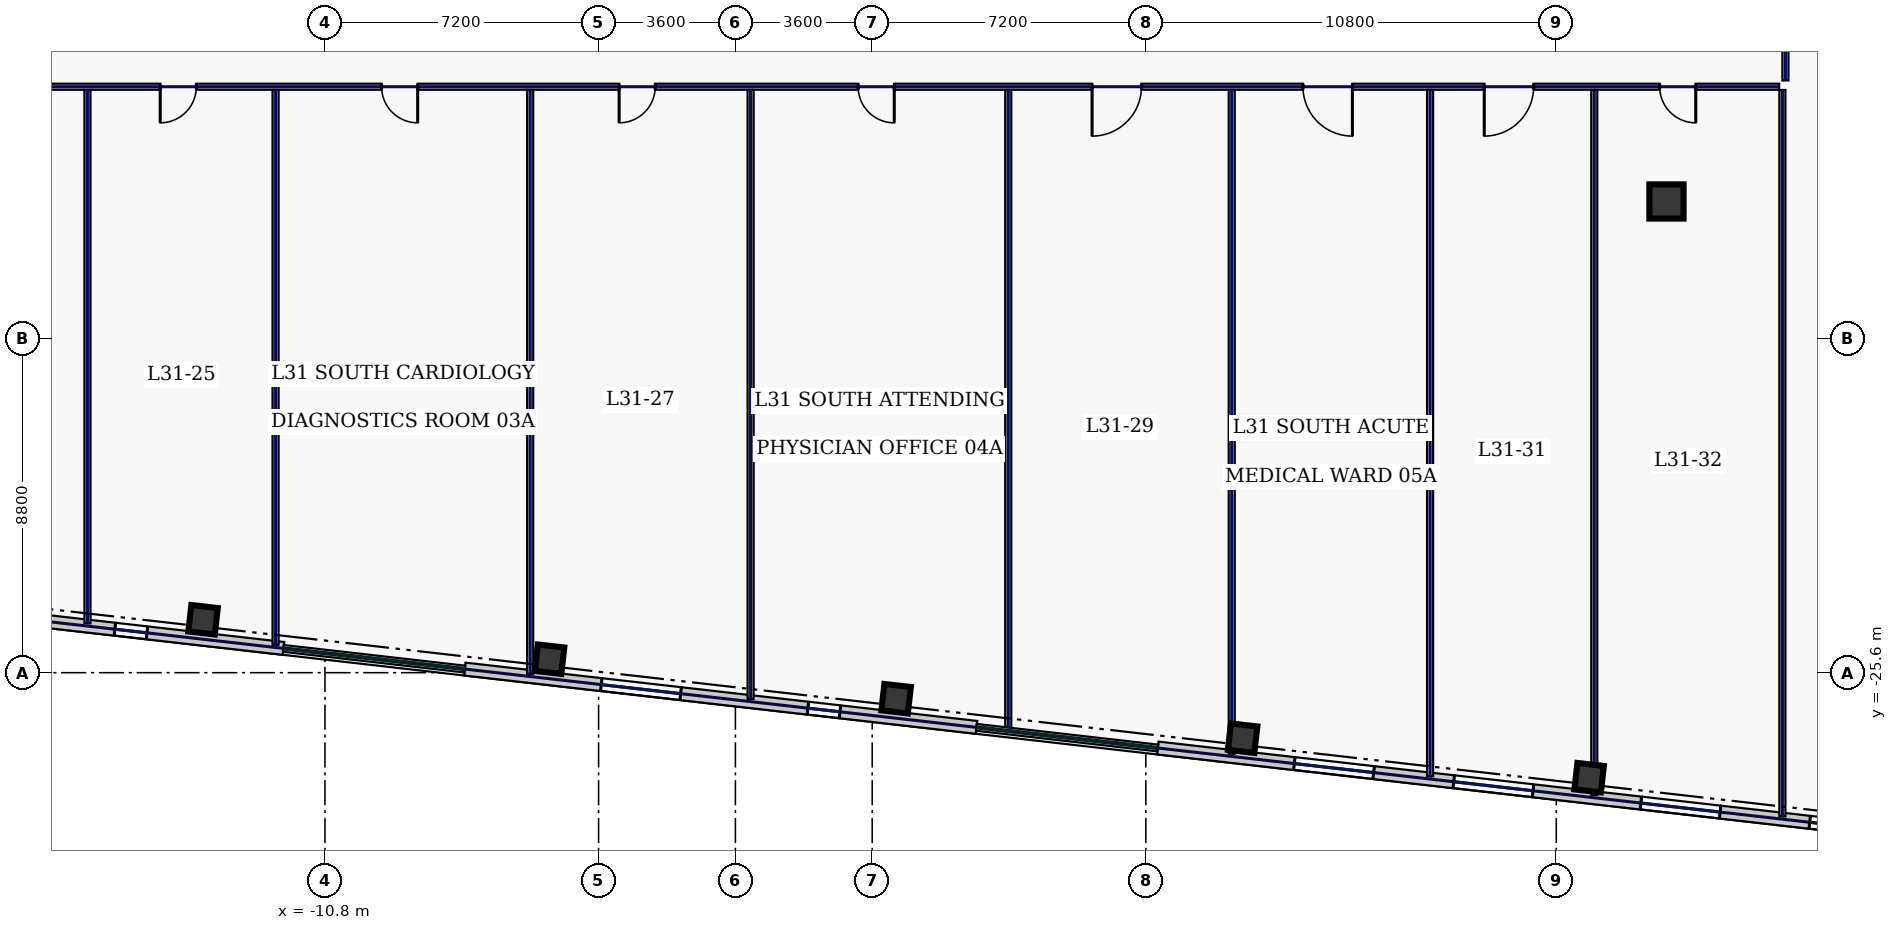
"""IFC4 building model, lengths in metres.
Left out: names, types, materials, properties, quantities, classifications, styles, units other than length and angle.
Written with IfcOpenShell. Run it as: python <this file> out.ifc"""

import sys

from ifc_helpers import new_model, si_unit, direction, frame, frame_2d, origin, origin_2d, place, context, subcontext, project, spatial, rectangle, hollow_rectangle, extrude, element, fill, save


model = new_model("IFC4")
c1 = context("Model", 3, precision=1e-05, world=origin(), true_north=direction((0.0, 1.0)))
c2 = subcontext(c1, "Body", "Model", "MODEL_VIEW")
j1 = project(units=[si_unit("LENGTHUNIT", "METRE"), si_unit("PLANEANGLEUNIT", "RADIAN")], contexts=[c1])
p1 = place(None, origin())
s1 = spatial("IfcSite", under=j1, at=p1, CompositionType="ELEMENT")
p2 = place(p1, origin())
s2 = spatial("IfcBuilding", under=s1, at=p2, CompositionType="ELEMENT")
p3 = place(p2, frame((0.0, 0.0, 137.4)))
s3 = spatial("IfcBuildingStorey", under=s2, at=p3, CompositionType="ELEMENT", Elevation=137.4)
p4 = place(p3, frame((24.5, -13.2, 0.0), z_axis=(0.0, 0.0, 1.0), x_axis=(1.0, 0.0, 0.0)))
e1 = element("IfcColumn", 1, at=p4, inside=s3, PredefinedType="COLUMN", context=c2, shape_type="SweptSolid", body=[
    extrude(hollow_rectangle(XDim=0.9, YDim=0.9, WallThickness=0.04, at=origin_2d()), origin(), (0.0, 0.0, 1.0), 3.74),
])
for number, where, z_axis, x_axis in (
    (2, (-14.008, -24.207, 0.0), (0.0, 0.0, 1.0), (0.994, -0.113, 0.0)),
    (3, (-4.89, -25.246, 0.0), (0.0, 0.0, 1.0), (0.994, -0.113, 0.0)),
    (4, (4.229, -26.284, 0.0), (0.0, 0.0, 1.0), (0.994, -0.113, 0.0)),
    (5, (13.347, -27.323, 0.0), (0.0, 0.0, 1.0), (0.994, -0.113, 0.0)),
    (6, (22.465, -28.362, 0.0), (0.0, 0.0, 1.0), (0.994, -0.113, 0.0)),
):
    element("IfcColumn", number, at=place(p3, frame(where, z_axis=z_axis, x_axis=x_axis)), inside=s3, PredefinedType="COLUMN", context=c2, shape_type="SweptSolid", body=[
        extrude(hollow_rectangle(XDim=0.7, YDim=0.7, WallThickness=0.032, at=origin_2d()), origin(), (0.0, 0.0, 1.0), 3.74),
    ])
p5 = place(p3, frame((-32.977, -22.559, 0.0), z_axis=(0.0, 0.0, 1.0), x_axis=(0.993571214605, -0.113208840243, 0.0)))
e7 = element("IfcWall", 7, at=p5, inside=s3, PredefinedType="STANDARD", context=c2, shape_type="SweptSolid", body=[
    extrude(rectangle(XDim=21.223, YDim=0.34, at=frame_2d((10.611, 0.0))), origin(), (0.0, 0.0, 1.0), 3.74),
])
p6 = place(p5, frame((2.108, 0.0, 0.67)))
e8 = element("IfcOpeningElement", 8, at=p6, cuts=e7, PredefinedType="OPENING", context=c2, shape_type="SweptSolid", body=[
    extrude(rectangle(XDim=2.1, YDim=2.2, at=frame_2d((1.05, 1.1))), frame((0.0, 0.18, 0.0), z_axis=(0.0, -1.0, 0.0), x_axis=(1.0, 0.0, 0.0)), (0.0, 0.0, 1.0), 0.36),
])
p7 = place(p5, frame((6.329, 0.0, 0.67)))
e9 = element("IfcOpeningElement", 9, at=p7, cuts=e7, PredefinedType="OPENING", context=c2, shape_type="SweptSolid", body=[
    extrude(rectangle(XDim=2.1, YDim=2.2, at=frame_2d((1.05, 1.1))), frame((0.0, 0.18, 0.0), z_axis=(0.0, -1.0, 0.0), x_axis=(1.0, 0.0, 0.0)), (0.0, 0.0, 1.0), 0.36),
])
p8 = place(p5, frame((11.285, 0.0, 0.67)))
e10 = element("IfcOpeningElement", 10, at=p8, cuts=e7, PredefinedType="OPENING", context=c2, shape_type="SweptSolid", body=[
    extrude(rectangle(XDim=2.1, YDim=2.2, at=frame_2d((1.05, 1.1))), frame((0.0, 0.18, 0.0), z_axis=(0.0, -1.0, 0.0), x_axis=(1.0, 0.0, 0.0)), (0.0, 0.0, 1.0), 0.36),
])
p9 = place(p5, frame((16.756, 0.0, 0.67)))
e11 = element("IfcOpeningElement", 11, at=p9, cuts=e7, PredefinedType="OPENING", context=c2, shape_type="SweptSolid", body=[
    extrude(rectangle(XDim=0.85, YDim=1.85, at=frame_2d((0.425, 0.925))), frame((0.0, 0.18, 0.0), z_axis=(0.0, -1.0, 0.0), x_axis=(1.0, 0.0, 0.0)), (0.0, 0.0, 1.0), 0.36),
])
p10 = place(p3, frame((-7.122, -25.504, 0.0), z_axis=(0.0, 0.0, 1.0), x_axis=(0.993571685551, -0.11320470693, 0.0)))
e12 = element("IfcWall", 12, at=p10, inside=s3, PredefinedType="STANDARD", context=c2, shape_type="SweptSolid", body=[
    extrude(rectangle(XDim=13.554, YDim=0.34, at=frame_2d((6.777, 0.0))), origin(), (0.0, 0.0, 1.0), 3.74),
])
p11 = place(p10, frame((3.616, 0.0, 0.67)))
e13 = element("IfcOpeningElement", 13, at=p11, cuts=e12, PredefinedType="OPENING", context=c2, shape_type="SweptSolid", body=[
    extrude(rectangle(XDim=2.1, YDim=2.2, at=frame_2d((1.05, 1.1))), frame((0.0, 0.18, 0.0), z_axis=(0.0, -1.0, 0.0), x_axis=(1.0, 0.0, 0.0)), (0.0, 0.0, 1.0), 0.36),
])
p12 = place(p10, frame((9.088, 0.0, 0.67)))
e14 = element("IfcOpeningElement", 14, at=p12, cuts=e12, PredefinedType="OPENING", context=c2, shape_type="SweptSolid", body=[
    extrude(rectangle(XDim=0.85, YDim=1.85, at=frame_2d((0.425, 0.925))), frame((0.0, 0.18, 0.0), z_axis=(0.0, -1.0, 0.0), x_axis=(1.0, 0.0, 0.0)), (0.0, 0.0, 1.0), 0.36),
])
p13 = place(p3, frame((11.115, -27.582, 0.0), z_axis=(0.0, 0.0, 1.0), x_axis=(0.993572655904, -0.113196190044, 0.0)))
e15 = element("IfcWall", 15, at=p13, inside=s3, PredefinedType="STANDARD", context=c2, shape_type="SweptSolid", body=[
    extrude(rectangle(XDim=21.223, YDim=0.34, at=frame_2d((10.611, 0.0))), origin(), (0.0, 0.0, 1.0), 3.74),
])
p14 = place(p13, frame((3.616, 0.0, 0.67)))
e16 = element("IfcOpeningElement", 16, at=p14, cuts=e15, PredefinedType="OPENING", context=c2, shape_type="SweptSolid", body=[
    extrude(rectangle(XDim=2.1, YDim=2.2, at=frame_2d((1.05, 1.1))), frame((0.0, 0.18, 0.0), z_axis=(0.0, -1.0, 0.0), x_axis=(1.0, 0.0, 0.0)), (0.0, 0.0, 1.0), 0.36),
])
p15 = place(p13, frame((7.838, 0.0, 0.67)))
e17 = element("IfcOpeningElement", 17, at=p15, cuts=e15, PredefinedType="OPENING", context=c2, shape_type="SweptSolid", body=[
    extrude(rectangle(XDim=2.1, YDim=2.2, at=frame_2d((1.05, 1.1))), frame((0.0, 0.18, 0.0), z_axis=(0.0, -1.0, 0.0), x_axis=(1.0, 0.0, 0.0)), (0.0, 0.0, 1.0), 0.36),
])
p16 = place(p13, frame((12.794, 0.0, 0.67)))
e18 = element("IfcOpeningElement", 18, at=p16, cuts=e15, PredefinedType="OPENING", context=c2, shape_type="SweptSolid", body=[
    extrude(rectangle(XDim=2.1, YDim=2.2, at=frame_2d((1.05, 1.1))), frame((0.0, 0.18, 0.0), z_axis=(0.0, -1.0, 0.0), x_axis=(1.0, 0.0, 0.0)), (0.0, 0.0, 1.0), 0.36),
])
p17 = place(p13, frame((17.265, 0.0, 0.22)))
e19 = element("IfcOpeningElement", 19, at=p17, cuts=e15, PredefinedType="OPENING", context=c2, shape_type="SweptSolid", body=[
    extrude(rectangle(XDim=1.6, YDim=1.2, at=frame_2d((0.8, 0.6))), frame((0.0, 0.18, 0.0), z_axis=(0.0, -1.0, 0.0), x_axis=(1.0, 0.0, 0.0)), (0.0, 0.0, 1.0), 0.36),
])
p18 = place(p3, frame((27.63, 10.115, 0.0), z_axis=(0.0, 0.0, 1.0), x_axis=(0.0, -1.0, 0.0)))
e20 = element("IfcWall", 20, at=p18, inside=s3, PredefinedType="PARTITIONING", context=c2, shape_type="SweptSolid", body=[
    extrude(rectangle(XDim=20.13, YDim=0.16, at=frame_2d((10.065, 0.0))), origin(), (0.0, 0.0, 1.0), 3.74),
])
p19 = place(p18, frame((17.181, 0.0, 0.0)))
e21 = element("IfcOpeningElement", 21, at=p19, cuts=e20, PredefinedType="OPENING", context=c2, shape_type="SweptSolid", body=[
    extrude(rectangle(XDim=0.95, YDim=2.2, at=frame_2d((0.475, 1.1))), frame((0.0, 0.09, 0.0), z_axis=(0.0, -1.0, 0.0), x_axis=(1.0, 0.0, 0.0)), (0.0, 0.0, 1.0), 0.18),
])
p20 = place(p18, frame((12.325, 0.0, 0.0)))
e22 = element("IfcOpeningElement", 22, at=p20, cuts=e20, PredefinedType="OPENING", context=c2, shape_type="SweptSolid", body=[
    extrude(rectangle(XDim=0.95, YDim=2.2, at=frame_2d((0.475, 1.1))), frame((0.0, 0.09, 0.0), z_axis=(0.0, -1.0, 0.0), x_axis=(1.0, 0.0, 0.0)), (0.0, 0.0, 1.0), 0.18),
])
p21 = place(p18, frame((7.125, 0.0, 0.0)))
e23 = element("IfcOpeningElement", 23, at=p21, cuts=e20, PredefinedType="OPENING", context=c2, shape_type="SweptSolid", body=[
    extrude(rectangle(XDim=0.95, YDim=2.2, at=frame_2d((0.475, 1.1))), frame((0.0, 0.09, 0.0), z_axis=(0.0, -1.0, 0.0), x_axis=(1.0, 0.0, 0.0)), (0.0, 0.0, 1.0), 0.18),
])
p22 = place(p18, frame((2.219, 0.0, 0.0)))
e24 = element("IfcOpeningElement", 24, at=p22, cuts=e20, PredefinedType="OPENING", context=c2, shape_type="SweptSolid", body=[
    extrude(rectangle(XDim=0.95, YDim=2.2, at=frame_2d((0.475, 1.1))), frame((0.0, 0.09, 0.0), z_axis=(0.0, -1.0, 0.0), x_axis=(1.0, 0.0, 0.0)), (0.0, 0.0, 1.0), 0.18),
])
p23 = place(p3, frame((27.465, -10.18, 0.0), z_axis=(0.0, 0.0, 1.0), x_axis=(-1.0, 0.0, 0.0)))
e25 = element("IfcWall", 25, at=p23, inside=s3, PredefinedType="PARTITIONING", context=c2, shape_type="SweptSolid", body=[
    extrude(rectangle(XDim=54.93, YDim=0.16, at=frame_2d((27.465, 0.0))), origin(), (0.0, 0.0, 1.0), 3.74),
])
p24 = place(p23, frame((52.106, 0.0, 0.0)))
e26 = element("IfcOpeningElement", 26, at=p24, cuts=e25, PredefinedType="OPENING", context=c2, shape_type="SweptSolid", body=[
    extrude(rectangle(XDim=0.95, YDim=2.2, at=frame_2d((0.475, 1.1))), frame((0.0, 0.09, 0.0), z_axis=(0.0, -1.0, 0.0), x_axis=(1.0, 0.0, 0.0)), (0.0, 0.0, 1.0), 0.18),
])
p25 = place(p23, frame((47.05, 0.0, 0.0)))
e27 = element("IfcOpeningElement", 27, at=p25, cuts=e25, PredefinedType="OPENING", context=c2, shape_type="SweptSolid", body=[
    extrude(rectangle(XDim=0.95, YDim=2.2, at=frame_2d((0.475, 1.1))), frame((0.0, 0.09, 0.0), z_axis=(0.0, -1.0, 0.0), x_axis=(1.0, 0.0, 0.0)), (0.0, 0.0, 1.0), 0.18),
])
p26 = place(p23, frame((41.65, 0.0, 0.0)))
e28 = element("IfcOpeningElement", 28, at=p26, cuts=e25, PredefinedType="OPENING", context=c2, shape_type="SweptSolid", body=[
    extrude(rectangle(XDim=0.95, YDim=2.2, at=frame_2d((0.475, 1.1))), frame((0.0, 0.09, 0.0), z_axis=(0.0, -1.0, 0.0), x_axis=(1.0, 0.0, 0.0)), (0.0, 0.0, 1.0), 0.18),
])
p27 = place(p23, frame((35.825, 0.0, 0.0)))
e29 = element("IfcOpeningElement", 29, at=p27, cuts=e25, PredefinedType="OPENING", context=c2, shape_type="SweptSolid", body=[
    extrude(rectangle(XDim=0.95, YDim=2.2, at=frame_2d((0.475, 1.1))), frame((0.0, 0.09, 0.0), z_axis=(0.0, -1.0, 0.0), x_axis=(1.0, 0.0, 0.0)), (0.0, 0.0, 1.0), 0.18),
])
p28 = place(p23, frame((29.575, 0.0, 0.0)))
e30 = element("IfcOpeningElement", 30, at=p28, cuts=e25, PredefinedType="OPENING", context=c2, shape_type="SweptSolid", body=[
    extrude(rectangle(XDim=0.95, YDim=2.2, at=frame_2d((0.475, 1.1))), frame((0.0, 0.09, 0.0), z_axis=(0.0, -1.0, 0.0), x_axis=(1.0, 0.0, 0.0)), (0.0, 0.0, 1.0), 0.18),
])
p29 = place(p23, frame((23.285, 0.0, 0.0)))
e31 = element("IfcOpeningElement", 31, at=p29, cuts=e25, PredefinedType="OPENING", context=c2, shape_type="SweptSolid", body=[
    extrude(rectangle(XDim=0.95, YDim=2.2, at=frame_2d((0.475, 1.1))), frame((0.0, 0.09, 0.0), z_axis=(0.0, -1.0, 0.0), x_axis=(1.0, 0.0, 0.0)), (0.0, 0.0, 1.0), 0.18),
])
p30 = place(p23, frame((16.78, 0.0, 0.0)))
e32 = element("IfcOpeningElement", 32, at=p30, cuts=e25, PredefinedType="OPENING", context=c2, shape_type="SweptSolid", body=[
    extrude(rectangle(XDim=1.3, YDim=2.2, at=frame_2d((0.65, 1.1))), frame((0.0, 0.09, 0.0), z_axis=(0.0, -1.0, 0.0), x_axis=(1.0, 0.0, 0.0)), (0.0, 0.0, 1.0), 0.18),
])
p31 = place(p23, frame((11.23, 0.0, 0.0)))
e33 = element("IfcOpeningElement", 33, at=p31, cuts=e25, PredefinedType="OPENING", context=c2, shape_type="SweptSolid", body=[
    extrude(rectangle(XDim=1.3, YDim=2.2, at=frame_2d((0.65, 1.1))), frame((0.0, 0.09, 0.0), z_axis=(0.0, -1.0, 0.0), x_axis=(1.0, 0.0, 0.0)), (0.0, 0.0, 1.0), 0.18),
])
p32 = place(p23, frame((6.46, 0.0, 0.0)))
e34 = element("IfcOpeningElement", 34, at=p32, cuts=e25, PredefinedType="OPENING", context=c2, shape_type="SweptSolid", body=[
    extrude(rectangle(XDim=1.3, YDim=2.2, at=frame_2d((0.65, 1.1))), frame((0.0, 0.09, 0.0), z_axis=(0.0, -1.0, 0.0), x_axis=(1.0, 0.0, 0.0)), (0.0, 0.0, 1.0), 0.18),
])
p33 = place(p23, frame((2.194, 0.0, 0.0)))
e35 = element("IfcOpeningElement", 35, at=p33, cuts=e25, PredefinedType="OPENING", context=c2, shape_type="SweptSolid", body=[
    extrude(rectangle(XDim=0.95, YDim=2.2, at=frame_2d((0.475, 1.1))), frame((0.0, 0.09, 0.0), z_axis=(0.0, -1.0, 0.0), x_axis=(1.0, 0.0, 0.0)), (0.0, 0.0, 1.0), 0.18),
])
p34 = place(p3, frame((27.55, -29.385, 0.0), z_axis=(0.0, 0.0, 1.0), x_axis=(0.0, 1.0, 0.0)))
e36 = element("IfcWall", 36, at=p34, inside=s3, PredefinedType="PARTITIONING", context=c2, shape_type="SweptSolid", body=[
    extrude(rectangle(XDim=19.12, YDim=0.16, at=frame_2d((9.56, 0.0))), origin(), (0.0, 0.0, 1.0), 3.74),
])
p35 = place(p3, frame((-12.1, -24.867, 0.0), z_axis=(0.0, 0.0, 1.0), x_axis=(0.0, 1.0, 0.0)))
e37 = element("IfcWall", 37, at=p35, inside=s3, PredefinedType="PARTITIONING", context=c2, shape_type="SweptSolid", body=[
    extrude(rectangle(XDim=14.602, YDim=0.16, at=frame_2d((7.301, 0.0))), origin(), (0.0, 0.0, 1.0), 3.74),
])
p36 = place(p3, frame((0.4, -26.291, 0.0), z_axis=(0.0, 0.0, 1.0), x_axis=(0.0, 1.0, 0.0)))
e38 = element("IfcWall", 38, at=p36, inside=s3, PredefinedType="PARTITIONING", context=c2, shape_type="SweptSolid", body=[
    extrude(rectangle(XDim=16.026, YDim=0.16, at=frame_2d((8.013, 0.0))), origin(), (0.0, 0.0, 1.0), 3.74),
])
p37 = place(p3, frame((13.06, -27.733, 0.0), z_axis=(0.0, 0.0, 1.0), x_axis=(0.0, 1.0, 0.0)))
e39 = element("IfcWall", 39, at=p37, inside=s3, PredefinedType="PARTITIONING", context=c2, shape_type="SweptSolid", body=[
    extrude(rectangle(XDim=17.469, YDim=0.16, at=frame_2d((8.734, 0.0))), origin(), (0.0, 0.0, 1.0), 3.74),
])
p38 = place(p3, frame((22.6, -28.82, 0.0), z_axis=(0.0, 0.0, 1.0), x_axis=(0.0, 1.0, 0.0)))
e40 = element("IfcWall", 40, at=p38, inside=s3, PredefinedType="PARTITIONING", context=c2, shape_type="SweptSolid", body=[
    extrude(rectangle(XDim=18.555, YDim=0.16, at=frame_2d((9.278, 0.0))), origin(), (0.0, 0.0, 1.0), 3.235),
])
p39 = place(p3, frame((-17.05, -24.303, 0.0), z_axis=(0.0, 0.0, 1.0), x_axis=(0.0, 1.0, 0.0)))
e41 = element("IfcWall", 41, at=p39, inside=s3, PredefinedType="PARTITIONING", context=c2, shape_type="SweptSolid", body=[
    extrude(rectangle(XDim=14.038, YDim=0.16, at=frame_2d((7.019, 0.0))), origin(), (0.0, 0.0, 1.0), 3.74),
])
p40 = place(p3, frame((-5.4, -25.63, 0.0), z_axis=(0.0, 0.0, 1.0), x_axis=(0.0, 1.0, 0.0)))
e42 = element("IfcWall", 42, at=p40, inside=s3, PredefinedType="PARTITIONING", context=c2, shape_type="SweptSolid", body=[
    extrude(rectangle(XDim=15.365, YDim=0.16, at=frame_2d((7.683, 0.0))), origin(), (0.0, 0.0, 1.0), 3.74),
])
p41 = place(p3, frame((7.18, -27.063, 0.0), z_axis=(0.0, 0.0, 1.0), x_axis=(0.0, 1.0, 0.0)))
e43 = element("IfcWall", 43, at=p41, inside=s3, PredefinedType="PARTITIONING", context=c2, shape_type="SweptSolid", body=[
    extrude(rectangle(XDim=16.799, YDim=0.16, at=frame_2d((8.399, 0.0))), origin(), (0.0, 0.0, 1.0), 3.74),
])
p42 = place(p3, frame((18.28, -28.328, 0.0), z_axis=(0.0, 0.0, 1.0), x_axis=(0.0, 1.0, 0.0)))
e44 = element("IfcWall", 44, at=p42, inside=s3, PredefinedType="PARTITIONING", context=c2, shape_type="SweptSolid", body=[
    extrude(rectangle(XDim=18.063, YDim=0.16, at=frame_2d((9.032, 0.0))), origin(), (0.0, 0.0, 1.0), 3.74),
])
p43 = place(p9, origin())
e45 = element("IfcWindow", 45, at=p43, inside=s3, PartitioningType="SINGLE_PANEL", PredefinedType="WINDOW", context=c2, shape_type="SweptSolid", body=[
    extrude(rectangle(XDim=0.85, YDim=1.85, at=frame_2d((0.425, 0.925))), frame((0.0, 0.03, 0.0), z_axis=(0.0, -1.0, 0.0), x_axis=(1.0, 0.0, 0.0)), (0.0, 0.0, 1.0), 0.06),
])
fill(e11, e45)
p44 = place(p11, origin())
e46 = element("IfcWindow", 46, at=p44, inside=s3, PartitioningType="SINGLE_PANEL", PredefinedType="WINDOW", context=c2, shape_type="SweptSolid", body=[
    extrude(rectangle(XDim=2.1, YDim=2.2, at=frame_2d((1.05, 1.1))), frame((0.0, 0.03, 0.0), z_axis=(0.0, -1.0, 0.0), x_axis=(1.0, 0.0, 0.0)), (0.0, 0.0, 1.0), 0.06),
])
fill(e13, e46)
p45 = place(p12, origin())
e47 = element("IfcWindow", 47, at=p45, inside=s3, PartitioningType="SINGLE_PANEL", PredefinedType="WINDOW", context=c2, shape_type="SweptSolid", body=[
    extrude(rectangle(XDim=0.85, YDim=1.85, at=frame_2d((0.425, 0.925))), frame((0.0, 0.03, 0.0), z_axis=(0.0, -1.0, 0.0), x_axis=(1.0, 0.0, 0.0)), (0.0, 0.0, 1.0), 0.06),
])
fill(e14, e47)
p46 = place(p14, origin())
e48 = element("IfcWindow", 48, at=p46, inside=s3, PartitioningType="SINGLE_PANEL", PredefinedType="WINDOW", context=c2, shape_type="SweptSolid", body=[
    extrude(rectangle(XDim=2.1, YDim=2.2, at=frame_2d((1.05, 1.1))), frame((0.0, 0.03, 0.0), z_axis=(0.0, -1.0, 0.0), x_axis=(1.0, 0.0, 0.0)), (0.0, 0.0, 1.0), 0.06),
])
fill(e16, e48)
p47 = place(p15, origin())
e49 = element("IfcWindow", 49, at=p47, inside=s3, PartitioningType="SINGLE_PANEL", PredefinedType="WINDOW", context=c2, shape_type="SweptSolid", body=[
    extrude(rectangle(XDim=2.1, YDim=2.2, at=frame_2d((1.05, 1.1))), frame((0.0, 0.03, 0.0), z_axis=(0.0, -1.0, 0.0), x_axis=(1.0, 0.0, 0.0)), (0.0, 0.0, 1.0), 0.06),
])
fill(e17, e49)
p48 = place(p16, origin())
e50 = element("IfcWindow", 50, at=p48, inside=s3, PartitioningType="SINGLE_PANEL", PredefinedType="WINDOW", context=c2, shape_type="SweptSolid", body=[
    extrude(rectangle(XDim=2.1, YDim=2.2, at=frame_2d((1.05, 1.1))), frame((0.0, 0.03, 0.0), z_axis=(0.0, -1.0, 0.0), x_axis=(1.0, 0.0, 0.0)), (0.0, 0.0, 1.0), 0.06),
])
fill(e18, e50)
p49 = place(p17, origin())
e51 = element("IfcWindow", 51, at=p49, inside=s3, PartitioningType="SINGLE_PANEL", PredefinedType="WINDOW", context=c2, shape_type="SweptSolid", body=[
    extrude(rectangle(XDim=1.6, YDim=1.2, at=frame_2d((0.8, 0.6))), frame((0.0, 0.03, 0.0), z_axis=(0.0, -1.0, 0.0), x_axis=(1.0, 0.0, 0.0)), (0.0, 0.0, 1.0), 0.06),
])
fill(e19, e51)
p50 = place(p26, origin())
e52 = element("IfcDoor", 52, at=p50, inside=s3, OperationType="SINGLE_SWING_RIGHT", PredefinedType="DOOR", context=c2, shape_type="SweptSolid", body=[
    extrude(rectangle(XDim=0.95, YDim=2.2, at=frame_2d((0.475, 1.1))), frame((0.0, 0.025, 0.0), z_axis=(0.0, -1.0, 0.0), x_axis=(1.0, 0.0, 0.0)), (0.0, 0.0, 1.0), 0.05),
])
fill(e28, e52)
p51 = place(p27, origin())
e53 = element("IfcDoor", 53, at=p51, inside=s3, OperationType="SINGLE_SWING_LEFT", PredefinedType="DOOR", context=c2, shape_type="SweptSolid", body=[
    extrude(rectangle(XDim=0.95, YDim=2.2, at=frame_2d((0.475, 1.1))), frame((0.0, 0.025, 0.0), z_axis=(0.0, -1.0, 0.0), x_axis=(1.0, 0.0, 0.0)), (0.0, 0.0, 1.0), 0.05),
])
fill(e29, e53)
p52 = place(p28, origin())
e54 = element("IfcDoor", 54, at=p52, inside=s3, OperationType="SINGLE_SWING_RIGHT", PredefinedType="DOOR", context=c2, shape_type="SweptSolid", body=[
    extrude(rectangle(XDim=0.95, YDim=2.2, at=frame_2d((0.475, 1.1))), frame((0.0, 0.025, 0.0), z_axis=(0.0, -1.0, 0.0), x_axis=(1.0, 0.0, 0.0)), (0.0, 0.0, 1.0), 0.05),
])
fill(e30, e54)
p53 = place(p29, origin())
e55 = element("IfcDoor", 55, at=p53, inside=s3, OperationType="SINGLE_SWING_LEFT", PredefinedType="DOOR", context=c2, shape_type="SweptSolid", body=[
    extrude(rectangle(XDim=0.95, YDim=2.2, at=frame_2d((0.475, 1.1))), frame((0.0, 0.025, 0.0), z_axis=(0.0, -1.0, 0.0), x_axis=(1.0, 0.0, 0.0)), (0.0, 0.0, 1.0), 0.05),
])
fill(e31, e55)
p54 = place(p30, origin())
e56 = element("IfcDoor", 56, at=p54, inside=s3, OperationType="SINGLE_SWING_RIGHT", PredefinedType="DOOR", context=c2, shape_type="SweptSolid", body=[
    extrude(rectangle(XDim=1.3, YDim=2.2, at=frame_2d((0.65, 1.1))), frame((0.0, 0.025, 0.0), z_axis=(0.0, -1.0, 0.0), x_axis=(1.0, 0.0, 0.0)), (0.0, 0.0, 1.0), 0.05),
])
fill(e32, e56)
p55 = place(p31, origin())
e57 = element("IfcDoor", 57, at=p55, inside=s3, OperationType="SINGLE_SWING_LEFT", PredefinedType="DOOR", context=c2, shape_type="SweptSolid", body=[
    extrude(rectangle(XDim=1.3, YDim=2.2, at=frame_2d((0.65, 1.1))), frame((0.0, 0.025, 0.0), z_axis=(0.0, -1.0, 0.0), x_axis=(1.0, 0.0, 0.0)), (0.0, 0.0, 1.0), 0.05),
])
fill(e33, e57)
p56 = place(p32, origin())
e58 = element("IfcDoor", 58, at=p56, inside=s3, OperationType="SINGLE_SWING_RIGHT", PredefinedType="DOOR", context=c2, shape_type="SweptSolid", body=[
    extrude(rectangle(XDim=1.3, YDim=2.2, at=frame_2d((0.65, 1.1))), frame((0.0, 0.025, 0.0), z_axis=(0.0, -1.0, 0.0), x_axis=(1.0, 0.0, 0.0)), (0.0, 0.0, 1.0), 0.05),
])
fill(e34, e58)
p57 = place(p33, origin())
e59 = element("IfcDoor", 59, at=p57, inside=s3, OperationType="SINGLE_SWING_LEFT", PredefinedType="DOOR", context=c2, shape_type="SweptSolid", body=[
    extrude(rectangle(XDim=0.95, YDim=2.2, at=frame_2d((0.475, 1.1))), frame((0.0, 0.025, 0.0), z_axis=(0.0, -1.0, 0.0), x_axis=(1.0, 0.0, 0.0)), (0.0, 0.0, 1.0), 0.05),
])
fill(e35, e59)
save(model, sys.argv[1])
